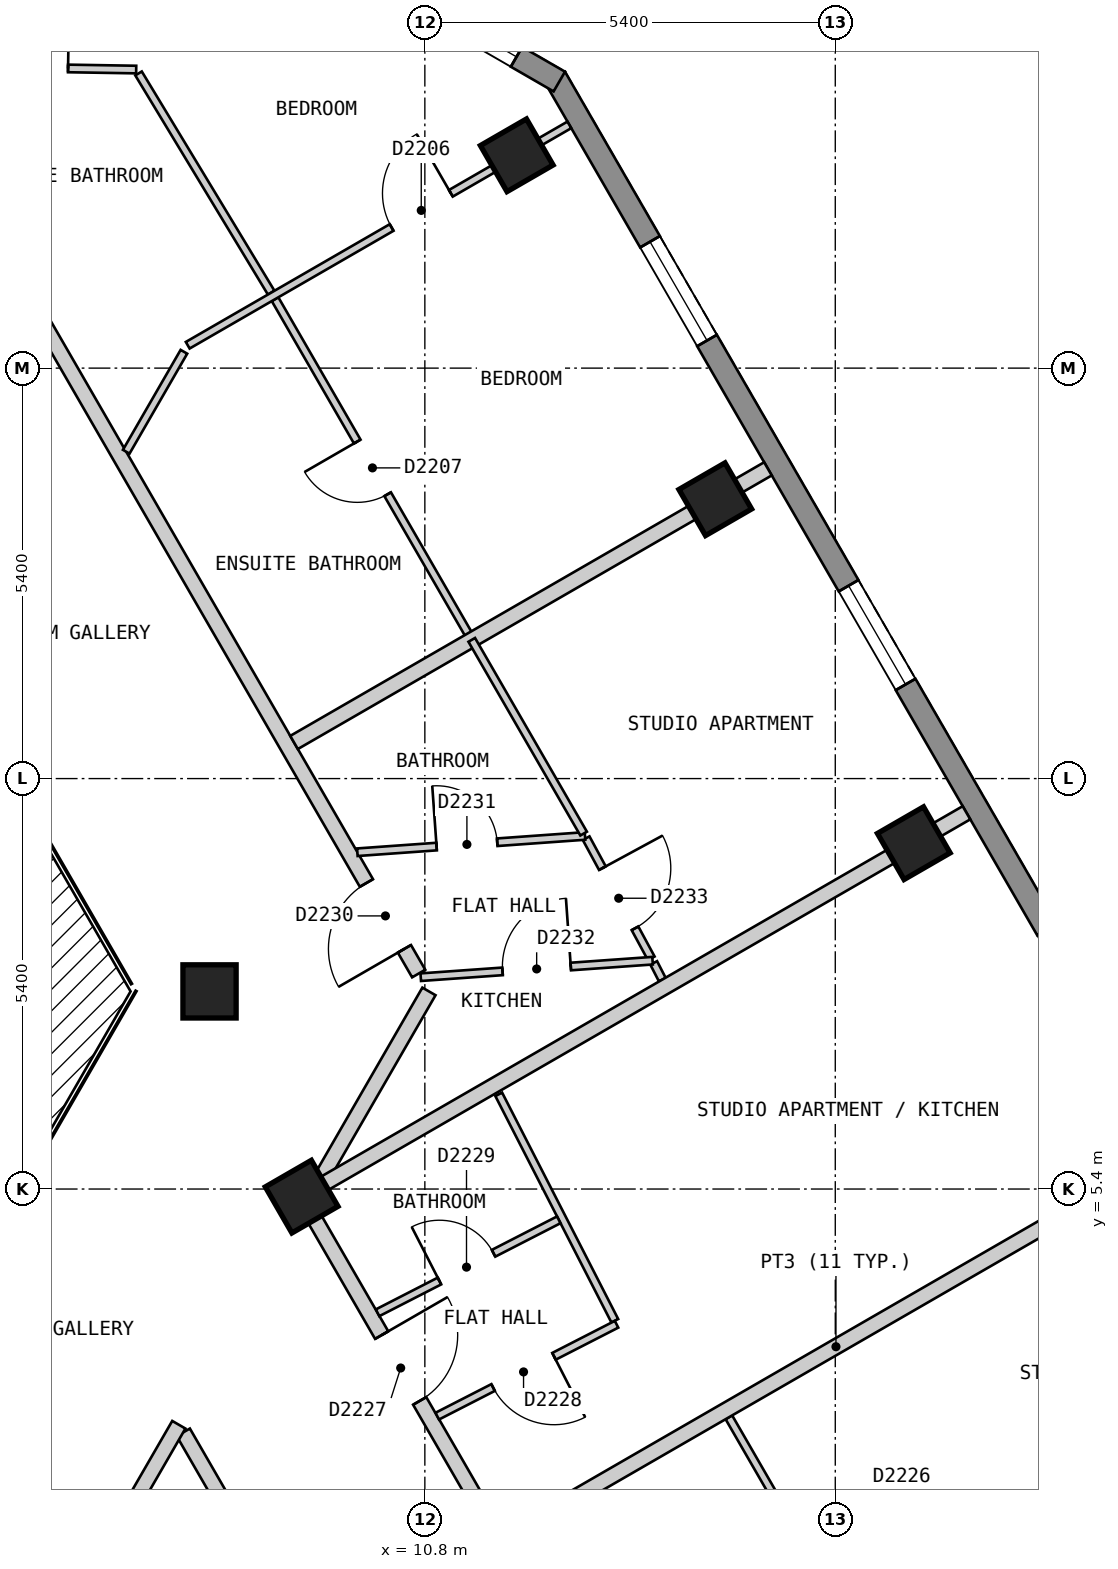
"""IFC4 building model, lengths in metres.
Left out: names, types, materials, properties, quantities, classifications, styles, units other than length and angle.
Written with IfcOpenShell. Run it as: python <this file> out.ifc"""

import sys

from ifc_helpers import new_model, si_unit, direction, frame, frame_2d, origin, origin_2d, place, context, subcontext, project, spatial, polyline, rectangle, outline, extrude, element, fill, save


model = new_model("IFC4")
c1 = context("Model", 3, precision=1e-05, world=origin(), true_north=direction((0.0, 1.0)))
c2 = subcontext(c1, "Body", "Model", "MODEL_VIEW")
j1 = project(units=[si_unit("LENGTHUNIT", "METRE"), si_unit("PLANEANGLEUNIT", "RADIAN")], contexts=[c1])
p1 = place(None, origin())
s1 = spatial("IfcSite", under=j1, at=p1, CompositionType="ELEMENT")
p2 = place(p1, origin())
s2 = spatial("IfcBuilding", under=s1, at=p2, CompositionType="ELEMENT")
p3 = place(p2, frame((0.0, 0.0, 235.8)))
s3 = spatial("IfcBuildingStorey", under=s2, at=p3, CompositionType="ELEMENT", Elevation=235.8)
for number, where, z_axis, x_axis in (
    (1, (17.233, 9.95, 0.0), (0.0, 0.0, 1.0), (-0.5, 0.866, 0.0)),
    (2, (14.621, 14.475, 0.0), (0.0, 0.0, 1.0), (-0.5, 0.866, 0.0)),
    (3, (12.009, 19.0, 0.0), (0.0, 0.0, 1.0), (-0.5, 0.866, 0.0)),
    (4, (9.179, 5.3, 0.0), (0.0, 0.0, 1.0), (-0.5, 0.866, 0.0)),
    (5, (7.967, 8.0, 0.0), (0.0, 0.0, 1.0), (1.0, 0.0, 0.0)),
):
    element("IfcColumn", number, at=place(p3, frame(where, z_axis=z_axis, x_axis=x_axis)), inside=s3, PredefinedType="COLUMN", context=c2, shape_type="SweptSolid", body=[
        extrude(rectangle(XDim=0.7, YDim=0.7, at=origin_2d()), origin(), (0.0, 0.0, 1.0), 3.0),
    ])
p4 = place(p3, frame((23.599, 0.825, 0.0), z_axis=(0.0, 0.0, 1.0), x_axis=(-0.500003656944, 0.866023292436, 0.0)))
e6 = element("IfcWall", 6, at=p4, inside=s3, PredefinedType="SOLIDWALL", context=c2, shape_type="SweptSolid", body=[
    extrude(outline(polyline([(0.0, -0.15), (22.17, -0.15), (22.09, 0.15), (0.08, 0.15), (0.0, -0.15)])), origin(), (0.0, 0.0, 1.0), 2.7),
])
p5 = place(p4, frame((2.497, 0.0, 0.15)))
e7 = element("IfcOpeningElement", 7, at=p5, cuts=e6, PredefinedType="OPENING", context=c2, shape_type="SweptSolid", body=[
    extrude(rectangle(XDim=1.5, YDim=2.1, at=frame_2d((0.75, 1.05))), frame((0.0, 0.16, 0.0), z_axis=(0.0, -1.0, 0.0), x_axis=(1.0, 0.0, 0.0)), (0.0, 0.0, 1.0), 0.32),
])
p6 = place(p4, frame((7.723, 0.0, 0.15)))
e8 = element("IfcOpeningElement", 8, at=p6, cuts=e6, PredefinedType="OPENING", context=c2, shape_type="SweptSolid", body=[
    extrude(rectangle(XDim=1.5, YDim=2.1, at=frame_2d((0.75, 1.05))), frame((0.0, 0.16, 0.0), z_axis=(0.0, -1.0, 0.0), x_axis=(1.0, 0.0, 0.0)), (0.0, 0.0, 1.0), 0.32),
])
p7 = place(p4, frame((12.948, 0.0, 0.15)))
e9 = element("IfcOpeningElement", 9, at=p7, cuts=e6, PredefinedType="OPENING", context=c2, shape_type="SweptSolid", body=[
    extrude(rectangle(XDim=1.5, YDim=2.1, at=frame_2d((0.75, 1.05))), frame((0.0, 0.16, 0.0), z_axis=(0.0, -1.0, 0.0), x_axis=(1.0, 0.0, 0.0)), (0.0, 0.0, 1.0), 0.32),
])
p8 = place(p4, frame((18.173, 0.0, 0.15)))
e10 = element("IfcOpeningElement", 10, at=p8, cuts=e6, PredefinedType="OPENING", context=c2, shape_type="SweptSolid", body=[
    extrude(rectangle(XDim=1.5, YDim=2.1, at=frame_2d((0.75, 1.05))), frame((0.0, 0.16, 0.0), z_axis=(0.0, -1.0, 0.0), x_axis=(1.0, 0.0, 0.0)), (0.0, 0.0, 1.0), 0.32),
])
p9 = place(p3, frame((12.569, 19.97, 0.0), z_axis=(0.0, 0.0, 1.0), x_axis=(-0.866022959057, 0.500004234368, 0.0)))
e11 = element("IfcWall", 11, at=p9, inside=s3, PredefinedType="SOLIDWALL", context=c2, shape_type="SweptSolid", body=[
    extrude(outline(polyline([(0.0, -0.15), (5.0, -0.15), (4.92, 0.15), (0.08, 0.15), (0.0, -0.15)])), origin(), (0.0, 0.0, 1.0), 2.7),
])
p10 = place(p9, frame((0.65, 0.0, 0.15)))
e12 = element("IfcOpeningElement", 12, at=p10, cuts=e11, PredefinedType="OPENING", context=c2, shape_type="SweptSolid", body=[
    extrude(rectangle(XDim=1.2, YDim=2.1, at=frame_2d((0.6, 1.05))), frame((0.0, 0.16, 0.0), z_axis=(0.0, -1.0, 0.0), x_axis=(1.0, 0.0, 0.0)), (0.0, 0.0, 1.0), 0.32),
])
p11 = place(p3, frame((7.622, 2.199, 0.0), z_axis=(0.0, 0.0, 1.0), x_axis=(0.499994660107, -0.866028486751, 0.0)))
e13 = element("IfcWall", 13, at=p11, inside=s3, PredefinedType="PARTITIONING", context=c2, shape_type="SweptSolid", body=[
    extrude(rectangle(XDim=4.27, YDim=0.2, at=frame_2d((2.135, 0.0))), origin(), (0.0, 0.0, 1.0), 2.7),
])
p12 = place(p11, frame((1.685, 0.0, 0.0)))
e14 = element("IfcOpeningElement", 14, at=p12, cuts=e13, PredefinedType="OPENING", context=c2, shape_type="SweptSolid", body=[
    extrude(rectangle(XDim=0.9, YDim=2.1, at=frame_2d((0.45, 1.05))), frame((0.0, 0.11, 0.0), z_axis=(0.0, -1.0, 0.0), x_axis=(1.0, 0.0, 0.0)), (0.0, 0.0, 1.0), 0.22),
])
p13 = place(p3, frame((9.238, 5.2, 0.0), z_axis=(0.0, 0.0, 1.0), x_axis=(0.500025705601, -0.86601056214, 0.0)))
e15 = element("IfcWall", 15, at=p13, inside=s3, PredefinedType="PARTITIONING", context=c2, shape_type="SweptSolid", body=[
    extrude(rectangle(XDim=7.735, YDim=0.2, at=frame_2d((3.868, 0.0))), origin(), (0.0, 0.0, 1.0), 2.7),
])
p14 = place(p13, frame((6.898, 0.0, 0.0)))
e16 = element("IfcOpeningElement", 16, at=p14, cuts=e15, PredefinedType="OPENING", context=c2, shape_type="SweptSolid", body=[
    extrude(rectangle(XDim=0.8, YDim=2.1, at=frame_2d((0.4, 1.05))), frame((0.0, 0.11, 0.0), z_axis=(0.0, -1.0, 0.0), x_axis=(1.0, 0.0, 0.0)), (0.0, 0.0, 1.0), 0.22),
])
p15 = place(p13, frame((1.988, 0.0, 0.0)))
e17 = element("IfcOpeningElement", 17, at=p15, cuts=e15, PredefinedType="OPENING", context=c2, shape_type="SweptSolid", body=[
    extrude(rectangle(XDim=1.0, YDim=2.1, at=frame_2d((0.5, 1.05))), frame((0.0, 0.11, 0.0), z_axis=(0.0, -1.0, 0.0), x_axis=(1.0, 0.0, 0.0)), (0.0, 0.0, 1.0), 0.22),
])
p16 = place(p3, frame((5.485, 17.3, 0.0), z_axis=(0.0, 0.0, 1.0), x_axis=(0.500017221754, -0.866015460572, 0.0)))
e18 = element("IfcWall", 18, at=p16, inside=s3, PredefinedType="PARTITIONING", context=c2, shape_type="SweptSolid", body=[
    extrude(rectangle(XDim=10.468, YDim=0.2, at=frame_2d((5.234, 0.0))), origin(), (0.0, 0.0, 1.0), 2.7),
])
p17 = place(p16, frame((9.092, 0.0, 0.0)))
e19 = element("IfcOpeningElement", 19, at=p17, cuts=e18, PredefinedType="OPENING", context=c2, shape_type="SweptSolid", body=[
    extrude(rectangle(XDim=1.0, YDim=2.1, at=frame_2d((0.5, 1.05))), frame((0.0, 0.11, 0.0), z_axis=(0.0, -1.0, 0.0), x_axis=(1.0, 0.0, 0.0)), (0.0, 0.0, 1.0), 0.22),
])
p18 = place(p3, frame((6.928, 1.2, 0.0), z_axis=(0.0, 0.0, 1.0), x_axis=(0.500255167297, 0.865878032746, 0.0)))
e20 = element("IfcWall", 20, at=p18, inside=s3, PredefinedType="PARTITIONING", context=c2, shape_type="SweptSolid", body=[
    extrude(rectangle(XDim=1.269, YDim=0.2, at=frame_2d((0.635, 0.0))), origin(), (0.0, 0.0, 1.0), 2.7),
])
p19 = place(p3, frame((9.354, 5.401, 0.0), z_axis=(0.0, 0.0, 1.0), x_axis=(0.499849222119, 0.866112437936, 0.0)))
e21 = element("IfcWall", 21, at=p19, inside=s3, PredefinedType="PARTITIONING", context=c2, shape_type="SweptSolid", body=[
    extrude(rectangle(XDim=3.001, YDim=0.2, at=frame_2d((1.5, 0.0))), origin(), (0.0, 0.0, 1.0), 2.7),
])
p20 = place(p3, frame((7.033, 20.077, 0.0), z_axis=(0.0, 0.0, 1.0), x_axis=(0.517730137343, -0.855543981854, 0.0)))
e22 = element("IfcWall", 22, at=p20, inside=s3, PredefinedType="PARTITIONING", context=c2, shape_type="SweptSolid", body=[
    extrude(rectangle(XDim=3.371, YDim=0.1, at=frame_2d((1.685, 0.0))), origin(), (0.0, 0.0, 1.0), 2.7),
])
p21 = place(p3, frame((14.8, 2.397, 0.0), z_axis=(0.0, 0.0, 1.0), x_axis=(0.49989805765, -0.866084252228, 0.0)))
e23 = element("IfcWall", 23, at=p21, inside=s3, PredefinedType="PARTITIONING", context=c2, shape_type="SweptSolid", body=[
    extrude(rectangle(XDim=1.404, YDim=0.1, at=frame_2d((0.702, 0.0))), origin(), (0.0, 0.0, 1.0), 2.7),
])
p22 = place(p3, frame((8.829, 17.107, 0.0), z_axis=(0.0, 0.0, 1.0), x_axis=(0.500035512416, -0.866004899711, 0.0)))
e24 = element("IfcWall", 24, at=p22, inside=s3, PredefinedType="PARTITIONING", context=c2, shape_type="SweptSolid", body=[
    extrude(rectangle(XDim=5.175, YDim=0.1, at=frame_2d((2.588, 0.0))), origin(), (0.0, 0.0, 1.0), 2.7),
])
p23 = place(p22, frame((2.163, 0.0, 0.0)))
e25 = element("IfcOpeningElement", 25, at=p23, cuts=e24, PredefinedType="OPENING", context=c2, shape_type="SweptSolid", body=[
    extrude(rectangle(XDim=0.8, YDim=2.1, at=frame_2d((0.4, 1.05))), frame((0.0, 0.06, 0.0), z_axis=(0.0, -1.0, 0.0), x_axis=(1.0, 0.0, 0.0)), (0.0, 0.0, 1.0), 0.12),
])
p24 = place(p3, frame((12.922, 10.016, 0.0), z_axis=(0.0, 0.0, 1.0), x_axis=(0.476510550025, -0.879168752695, 0.0)))
e26 = element("IfcWall", 26, at=p24, inside=s3, PredefinedType="PARTITIONING", context=c2, shape_type="SweptSolid", body=[
    extrude(rectangle(XDim=1.798, YDim=0.1, at=frame_2d((0.899, 0.0))), origin(), (0.0, 0.0, 1.0), 2.7),
])
p25 = place(p24, frame((0.449, 0.0, 0.0)))
e27 = element("IfcOpeningElement", 27, at=p25, cuts=e26, PredefinedType="OPENING", context=c2, shape_type="SweptSolid", body=[
    extrude(rectangle(XDim=0.9, YDim=2.1, at=frame_2d((0.45, 1.05))), frame((0.0, 0.06, 0.0), z_axis=(0.0, -1.0, 0.0), x_axis=(1.0, 0.0, 0.0)), (0.0, 0.0, 1.0), 0.12),
])
p26 = place(p3, frame((13.811, 8.375, 0.0), z_axis=(0.0, 0.0, 1.0), x_axis=(0.457058020142, -0.889436881529, 0.0)))
e28 = element("IfcWall", 28, at=p26, inside=s3, PredefinedType="PARTITIONING", context=c2, shape_type="SweptSolid", body=[
    extrude(rectangle(XDim=0.247, YDim=0.1, at=frame_2d((0.124, 0.0))), origin(), (0.0, 0.0, 1.0), 2.7),
])
p27 = place(p3, frame((11.772, 6.646, 0.0), z_axis=(0.0, 0.0, 1.0), x_axis=(0.456175983405, -0.889889584254, 0.0)))
e29 = element("IfcWall", 29, at=p27, inside=s3, PredefinedType="PARTITIONING", context=c2, shape_type="SweptSolid", body=[
    extrude(rectangle(XDim=3.348, YDim=0.1, at=frame_2d((1.674, 0.0))), origin(), (0.0, 0.0, 1.0), 2.7),
])
p28 = place(p3, frame((2.56, 20.2, 0.0), z_axis=(0.0, 0.0, 1.0), x_axis=(0.999868576801, -0.016212005615, 0.0)))
e30 = element("IfcWall", 30, at=p28, inside=s3, PredefinedType="PARTITIONING", context=c2, shape_type="SweptSolid", body=[
    extrude(rectangle(XDim=4.442, YDim=0.1, at=frame_2d((2.221, 0.0))), origin(), (0.0, 0.0, 1.0), 2.7),
])
p29 = place(p28, frame((2.746, 0.0, 0.0)))
e31 = element("IfcOpeningElement", 31, at=p29, cuts=e30, PredefinedType="OPENING", context=c2, shape_type="SweptSolid", body=[
    extrude(rectangle(XDim=0.8, YDim=2.1, at=frame_2d((0.4, 1.05))), frame((0.0, 0.06, 0.0), z_axis=(0.0, -1.0, 0.0), x_axis=(1.0, 0.0, 0.0)), (0.0, 0.0, 1.0), 0.12),
])
p30 = place(p3, frame((6.871, 15.1, 0.0), z_axis=(0.0, 0.0, 1.0), x_axis=(0.499805980977, 0.866137391745, 0.0)))
e32 = element("IfcWall", 32, at=p30, inside=s3, PredefinedType="PARTITIONING", context=c2, shape_type="SweptSolid", body=[
    extrude(rectangle(XDim=1.518, YDim=0.1, at=frame_2d((0.759, 0.0))), origin(), (0.0, 0.0, 1.0), 2.7),
])
p31 = place(p3, frame((10.178, 3.772, 0.0), z_axis=(0.0, 0.0, 1.0), x_axis=(0.889732071959, 0.456483121405, 0.0)))
e33 = element("IfcWall", 33, at=p31, inside=s3, PredefinedType="PARTITIONING", context=c2, shape_type="SweptSolid", body=[
    extrude(rectangle(XDim=2.679, YDim=0.1, at=frame_2d((1.34, 0.0))), origin(), (0.0, 0.0, 1.0), 2.7),
])
p32 = place(p31, frame((0.915, 0.0, 0.0)))
e34 = element("IfcOpeningElement", 34, at=p32, cuts=e33, PredefinedType="OPENING", context=c2, shape_type="SweptSolid", body=[
    extrude(rectangle(XDim=0.8, YDim=2.1, at=frame_2d((0.4, 1.05))), frame((0.0, 0.06, 0.0), z_axis=(0.0, -1.0, 0.0), x_axis=(1.0, 0.0, 0.0)), (0.0, 0.0, 1.0), 0.12),
])
p33 = place(p3, frame((10.963, 2.412, 0.0), z_axis=(0.0, 0.0, 1.0), x_axis=(0.889943997558, 0.456069820543, 0.0)))
e35 = element("IfcWall", 35, at=p33, inside=s3, PredefinedType="PARTITIONING", context=c2, shape_type="SweptSolid", body=[
    extrude(rectangle(XDim=2.651, YDim=0.1, at=frame_2d((1.325, 0.0))), origin(), (0.0, 0.0, 1.0), 2.7),
])
p34 = place(p33, frame((0.826, 0.0, 0.0)))
e36 = element("IfcOpeningElement", 36, at=p34, cuts=e35, PredefinedType="OPENING", context=c2, shape_type="SweptSolid", body=[
    extrude(rectangle(XDim=0.9, YDim=2.1, at=frame_2d((0.45, 1.05))), frame((0.0, 0.06, 0.0), z_axis=(0.0, -1.0, 0.0), x_axis=(1.0, 0.0, 0.0)), (0.0, 0.0, 1.0), 0.12),
])
p35 = place(p3, frame((7.68, 16.501, 0.0), z_axis=(0.0, 0.0, 1.0), x_axis=(0.86602149507, 0.500006770031, 0.0)))
e37 = element("IfcWall", 37, at=p35, inside=s3, PredefinedType="PARTITIONING", context=c2, shape_type="SweptSolid", body=[
    extrude(rectangle(XDim=5.798, YDim=0.1, at=frame_2d((2.899, 0.0))), origin(), (0.0, 0.0, 1.0), 2.7),
])
p36 = place(p35, frame((3.098, 0.0, 0.0)))
e38 = element("IfcOpeningElement", 38, at=p36, cuts=e37, PredefinedType="OPENING", context=c2, shape_type="SweptSolid", body=[
    extrude(rectangle(XDim=0.9, YDim=2.1, at=frame_2d((0.45, 1.05))), frame((0.0, 0.06, 0.0), z_axis=(0.0, -1.0, 0.0), x_axis=(1.0, 0.0, 0.0)), (0.0, 0.0, 1.0), 0.12),
])
p37 = place(p3, frame((10.746, 8.187, 0.0), z_axis=(0.0, 0.0, 1.0), x_axis=(0.997477310687, 0.070986017387, 0.0)))
e39 = element("IfcWall", 39, at=p37, inside=s3, PredefinedType="PARTITIONING", context=c2, shape_type="SweptSolid", body=[
    extrude(rectangle(XDim=3.058, YDim=0.1, at=frame_2d((1.529, 0.0))), origin(), (0.0, 0.0, 1.0), 2.7),
])
p38 = place(p37, frame((1.079, 0.0, 0.0)))
e40 = element("IfcOpeningElement", 40, at=p38, cuts=e39, PredefinedType="OPENING", context=c2, shape_type="SweptSolid", body=[
    extrude(rectangle(XDim=0.9, YDim=2.1, at=frame_2d((0.45, 1.05))), frame((0.0, 0.06, 0.0), z_axis=(0.0, -1.0, 0.0), x_axis=(1.0, 0.0, 0.0)), (0.0, 0.0, 1.0), 0.12),
])
p39 = place(p3, frame((9.912, 9.831, 0.0), z_axis=(0.0, 0.0, 1.0), x_axis=(0.997459937941, 0.071229714326, 0.0)))
e41 = element("IfcWall", 41, at=p39, inside=s3, PredefinedType="PARTITIONING", context=c2, shape_type="SweptSolid", body=[
    extrude(rectangle(XDim=3.002, YDim=0.1, at=frame_2d((1.501, 0.0))), origin(), (0.0, 0.0, 1.0), 2.7),
])
p40 = place(p39, frame((1.045, 0.0, 0.0)))
e42 = element("IfcOpeningElement", 42, at=p40, cuts=e41, PredefinedType="OPENING", context=c2, shape_type="SweptSolid", body=[
    extrude(rectangle(XDim=0.8, YDim=2.1, at=frame_2d((0.4, 1.05))), frame((0.0, 0.06, 0.0), z_axis=(0.0, -1.0, 0.0), x_axis=(1.0, 0.0, 0.0)), (0.0, 0.0, 1.0), 0.12),
])
p41 = place(p3, frame((11.879, 0.826, 0.0), z_axis=(0.0, 0.0, 1.0), x_axis=(0.866065245018, 0.499930986609, 0.0)))
e43 = element("IfcWall", 43, at=p41, inside=s3, PredefinedType="PARTITIONING", context=c2, shape_type="SweptSolid", body=[
    extrude(rectangle(XDim=10.0, YDim=0.2, at=frame_2d((5.0, 0.0))), origin(), (0.0, 0.0, 1.0), 2.7),
])
p42 = place(p3, frame((9.457, 5.461, 0.0), z_axis=(0.0, 0.0, 1.0), x_axis=(0.866043818878, 0.499968102766, 0.0)))
e44 = element("IfcWall", 44, at=p42, inside=s3, PredefinedType="PARTITIONING", context=c2, shape_type="SweptSolid", body=[
    extrude(rectangle(XDim=9.779, YDim=0.2, at=frame_2d((4.89, 0.0))), origin(), (0.0, 0.0, 1.0), 2.7),
])
p43 = place(p3, frame((9.079, 11.275, 0.0), z_axis=(0.0, 0.0, 1.0), x_axis=(0.866001485781, 0.500041424909, 0.0)))
e45 = element("IfcWall", 45, at=p43, inside=s3, PredefinedType="PARTITIONING", context=c2, shape_type="SweptSolid", body=[
    extrude(rectangle(XDim=7.2, YDim=0.2, at=frame_2d((3.6, 0.0))), origin(), (0.0, 0.0, 1.0), 2.7),
])
p44 = place(p3, frame((11.417, 12.625, 0.0), z_axis=(0.0, 0.0, 1.0), x_axis=(0.500055103712, -0.865993587304, 0.0)))
e46 = element("IfcWall", 46, at=p44, inside=s3, PredefinedType="PARTITIONING", context=c2, shape_type="SweptSolid", body=[
    extrude(rectangle(XDim=2.944, YDim=0.1, at=frame_2d((1.472, 0.0))), origin(), (0.0, 0.0, 1.0), 2.7),
])
p45 = place(p7, origin())
e47 = element("IfcWindow", 47, at=p45, inside=s3, PartitioningType="SINGLE_PANEL", PredefinedType="WINDOW", context=c2, shape_type="SweptSolid", body=[
    extrude(rectangle(XDim=1.5, YDim=2.1, at=frame_2d((0.75, 1.05))), frame((0.0, 0.03, 0.0), z_axis=(0.0, -1.0, 0.0), x_axis=(1.0, 0.0, 0.0)), (0.0, 0.0, 1.0), 0.06),
])
fill(e9, e47)
p46 = place(p8, origin())
e48 = element("IfcWindow", 48, at=p46, inside=s3, PartitioningType="SINGLE_PANEL", PredefinedType="WINDOW", context=c2, shape_type="SweptSolid", body=[
    extrude(rectangle(XDim=1.5, YDim=2.1, at=frame_2d((0.75, 1.05))), frame((0.0, 0.03, 0.0), z_axis=(0.0, -1.0, 0.0), x_axis=(1.0, 0.0, 0.0)), (0.0, 0.0, 1.0), 0.06),
])
fill(e10, e48)
p47 = place(p10, origin())
e49 = element("IfcWindow", 49, at=p47, inside=s3, PartitioningType="SINGLE_PANEL", PredefinedType="WINDOW", context=c2, shape_type="SweptSolid", body=[
    extrude(rectangle(XDim=1.2, YDim=2.1, at=frame_2d((0.6, 1.05))), frame((0.0, 0.03, 0.0), z_axis=(0.0, -1.0, 0.0), x_axis=(1.0, 0.0, 0.0)), (0.0, 0.0, 1.0), 0.06),
])
fill(e12, e49)
p48 = place(p36, origin())
e50 = element("IfcDoor", 50, at=p48, inside=s3, OperationType="SINGLE_SWING_RIGHT", PredefinedType="DOOR", context=c2, shape_type="SweptSolid", body=[
    extrude(rectangle(XDim=0.9, YDim=2.1, at=frame_2d((0.45, 1.05))), frame((0.0, 0.025, 0.0), z_axis=(0.0, -1.0, 0.0), x_axis=(1.0, 0.0, 0.0)), (0.0, 0.0, 1.0), 0.05),
])
fill(e38, e50)
p49 = place(p23, origin())
e51 = element("IfcDoor", 51, at=p49, inside=s3, OperationType="SINGLE_SWING_LEFT", PredefinedType="DOOR", context=c2, shape_type="SweptSolid", body=[
    extrude(rectangle(XDim=0.8, YDim=2.1, at=frame_2d((0.4, 1.05))), frame((0.0, 0.025, 0.0), z_axis=(0.0, -1.0, 0.0), x_axis=(1.0, 0.0, 0.0)), (0.0, 0.0, 1.0), 0.05),
])
fill(e25, e51)
p50 = place(p29, origin())
e52 = element("IfcDoor", 52, at=p50, inside=s3, OperationType="SINGLE_SWING_RIGHT", PredefinedType="DOOR", context=c2, shape_type="SweptSolid", body=[
    extrude(rectangle(XDim=0.8, YDim=2.1, at=frame_2d((0.4, 1.05))), frame((0.0, 0.025, 0.0), z_axis=(0.0, -1.0, 0.0), x_axis=(1.0, 0.0, 0.0)), (0.0, 0.0, 1.0), 0.05),
])
fill(e31, e52)
p51 = place(p15, origin())
e53 = element("IfcDoor", 53, at=p51, inside=s3, OperationType="SINGLE_SWING_LEFT", PredefinedType="DOOR", context=c2, shape_type="SweptSolid", body=[
    extrude(rectangle(XDim=1.0, YDim=2.1, at=frame_2d((0.5, 1.05))), frame((0.0, 0.025, 0.0), z_axis=(0.0, -1.0, 0.0), x_axis=(1.0, 0.0, 0.0)), (0.0, 0.0, 1.0), 0.05),
])
fill(e17, e53)
p52 = place(p34, origin())
e54 = element("IfcDoor", 54, at=p52, inside=s3, OperationType="SINGLE_SWING_RIGHT", PredefinedType="DOOR", context=c2, shape_type="SweptSolid", body=[
    extrude(rectangle(XDim=0.9, YDim=2.1, at=frame_2d((0.45, 1.05))), frame((0.0, 0.025, 0.0), z_axis=(0.0, -1.0, 0.0), x_axis=(1.0, 0.0, 0.0)), (0.0, 0.0, 1.0), 0.05),
])
fill(e36, e54)
p53 = place(p32, origin())
e55 = element("IfcDoor", 55, at=p53, inside=s3, OperationType="SINGLE_SWING_LEFT", PredefinedType="DOOR", context=c2, shape_type="SweptSolid", body=[
    extrude(rectangle(XDim=0.8, YDim=2.1, at=frame_2d((0.4, 1.05))), frame((0.0, 0.025, 0.0), z_axis=(0.0, -1.0, 0.0), x_axis=(1.0, 0.0, 0.0)), (0.0, 0.0, 1.0), 0.05),
])
fill(e34, e55)
p54 = place(p17, origin())
e56 = element("IfcDoor", 56, at=p54, inside=s3, OperationType="SINGLE_SWING_RIGHT", PredefinedType="DOOR", context=c2, shape_type="SweptSolid", body=[
    extrude(rectangle(XDim=1.0, YDim=2.1, at=frame_2d((0.5, 1.05))), frame((0.0, 0.025, 0.0), z_axis=(0.0, -1.0, 0.0), x_axis=(1.0, 0.0, 0.0)), (0.0, 0.0, 1.0), 0.05),
])
fill(e19, e56)
p55 = place(p40, origin())
e57 = element("IfcDoor", 57, at=p55, inside=s3, OperationType="SINGLE_SWING_LEFT", PredefinedType="DOOR", context=c2, shape_type="SweptSolid", body=[
    extrude(rectangle(XDim=0.8, YDim=2.1, at=frame_2d((0.4, 1.05))), frame((0.0, 0.025, 0.0), z_axis=(0.0, -1.0, 0.0), x_axis=(1.0, 0.0, 0.0)), (0.0, 0.0, 1.0), 0.05),
])
fill(e42, e57)
p56 = place(p38, origin())
e58 = element("IfcDoor", 58, at=p56, inside=s3, OperationType="SINGLE_SWING_RIGHT", PredefinedType="DOOR", context=c2, shape_type="SweptSolid", body=[
    extrude(rectangle(XDim=0.9, YDim=2.1, at=frame_2d((0.45, 1.05))), frame((0.0, 0.025, 0.0), z_axis=(0.0, -1.0, 0.0), x_axis=(1.0, 0.0, 0.0)), (0.0, 0.0, 1.0), 0.05),
])
fill(e40, e58)
p57 = place(p25, origin())
e59 = element("IfcDoor", 59, at=p57, inside=s3, OperationType="SINGLE_SWING_LEFT", PredefinedType="DOOR", context=c2, shape_type="SweptSolid", body=[
    extrude(rectangle(XDim=0.9, YDim=2.1, at=frame_2d((0.45, 1.05))), frame((0.0, 0.025, 0.0), z_axis=(0.0, -1.0, 0.0), x_axis=(1.0, 0.0, 0.0)), (0.0, 0.0, 1.0), 0.05),
])
fill(e27, e59)
save(model, sys.argv[1])
